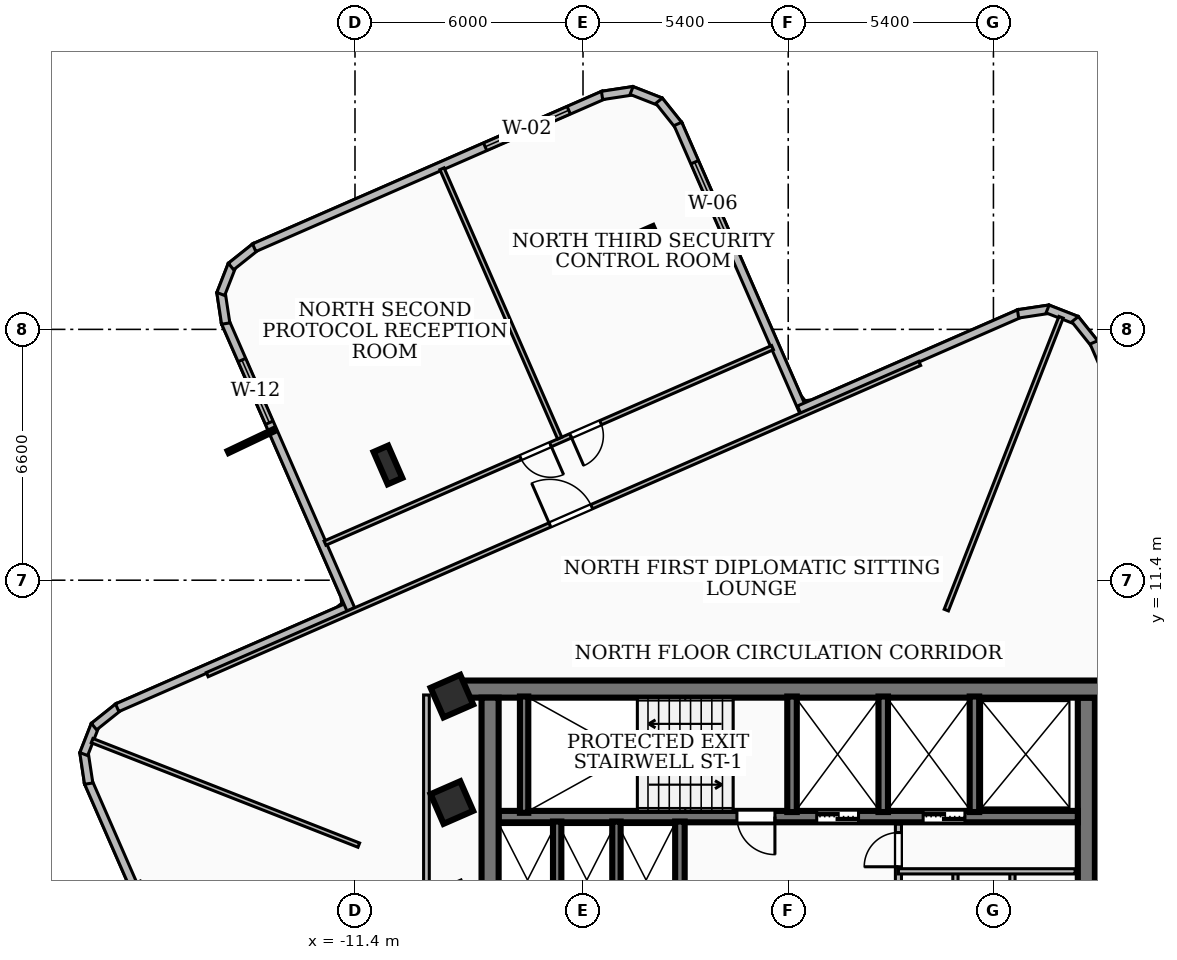
"""IFC4 building model, lengths in metres.
Left out: names, types, materials, properties, quantities, classifications, styles, units other than length and angle.
Written with IfcOpenShell. Run it as: python <this file> out.ifc"""

import sys

from ifc_helpers import new_model, si_unit, direction, frame, frame_2d, origin, origin_2d, place, context, subcontext, project, spatial, rectangle, i_section, extrude, element, fill, save


model = new_model("IFC4")
c1 = context("Model", 3, precision=1e-05, world=origin(), true_north=direction((0.0, 1.0)))
c2 = subcontext(c1, "Body", "Model", "MODEL_VIEW")
j1 = project(units=[si_unit("LENGTHUNIT", "METRE"), si_unit("PLANEANGLEUNIT", "RADIAN")], contexts=[c1])
p1 = place(None, origin())
s1 = spatial("IfcSite", under=j1, at=p1, CompositionType="ELEMENT")
p2 = place(p1, origin())
s2 = spatial("IfcBuilding", under=s1, at=p2, CompositionType="ELEMENT")
p3 = place(p2, frame((0.0, 0.0, 181.08)))
s3 = spatial("IfcBuildingStorey", under=s2, at=p3, CompositionType="ELEMENT", Elevation=181.08)
p4 = place(p3, frame((-8.78, 8.535, 0.0), z_axis=(0.0, 0.0, 1.0), x_axis=(1.0, 0.0, 0.0)))
e1 = element("IfcWall", 1, at=p4, inside=s3, PredefinedType="SHEAR", context=c2, shape_type="SweptSolid", body=[
    extrude(rectangle(XDim=17.56, YDim=0.45, at=frame_2d((8.78, 0.0))), origin(), (0.0, 0.0, 1.0), 3.34),
])
for number, where, z_axis, x_axis in (
    (2, (-7.845, 1.975, 0.0), (0.0, 0.0, 1.0), (0.0, 1.0, 0.0)),
    (3, (7.845, 8.31, 0.0), (0.0, 0.0, 1.0), (0.0, -1.0, 0.0)),
):
    element("IfcWall", number, at=place(p3, frame(where, z_axis=z_axis, x_axis=x_axis)), inside=s3, PredefinedType="SHEAR", context=c2, shape_type="SweptSolid", body=[
        extrude(rectangle(XDim=6.335, YDim=0.45, at=frame_2d((3.167, 0.0))), origin(), (0.0, 0.0, 1.0), 3.34),
    ])
p5 = place(p3, frame((7.62, 5.18, 0.0), z_axis=(0.0, 0.0, 1.0), x_axis=(-1.0, 0.0, 0.0)))
e4 = element("IfcWall", 4, at=p5, inside=s3, PredefinedType="SOLIDWALL", context=c2, shape_type="SweptSolid", body=[
    extrude(rectangle(XDim=15.24, YDim=0.3, at=frame_2d((7.62, 0.0))), origin(), (0.0, 0.0, 1.0), 3.34),
])
p6 = place(p5, frame((5.77, 0.0, 0.0)))
e5 = element("IfcOpeningElement", 5, at=p6, cuts=e4, PredefinedType="OPENING", context=c2, shape_type="SweptSolid", body=[
    extrude(rectangle(XDim=1.1, YDim=2.15, at=frame_2d((0.55, 1.075))), frame((0.0, 0.16, 0.0), z_axis=(0.0, -1.0, 0.0), x_axis=(1.0, 0.0, 0.0)), (0.0, 0.0, 1.0), 0.32),
])
p7 = place(p5, frame((2.97, 0.0, 0.0)))
e6 = element("IfcOpeningElement", 6, at=p7, cuts=e4, PredefinedType="OPENING", context=c2, shape_type="SweptSolid", body=[
    extrude(rectangle(XDim=1.1, YDim=2.15, at=frame_2d((0.55, 1.075))), frame((0.0, 0.16, 0.0), z_axis=(0.0, -1.0, 0.0), x_axis=(1.0, 0.0, 0.0)), (0.0, 0.0, 1.0), 0.32),
])
p8 = place(p5, frame((7.97, 0.0, 0.0)))
e7 = element("IfcOpeningElement", 7, at=p8, cuts=e4, PredefinedType="OPENING", context=c2, shape_type="SweptSolid", body=[
    extrude(rectangle(XDim=1.0, YDim=2.1, at=frame_2d((0.5, 1.05))), frame((0.0, 0.16, 0.0), z_axis=(0.0, -1.0, 0.0), x_axis=(1.0, 0.0, 0.0)), (0.0, 0.0, 1.0), 0.32),
])
p9 = place(p3, frame((-6.95, 5.28, 0.0), z_axis=(0.0, 0.0, 1.0), x_axis=(0.0, 1.0, 0.0)))
e8 = element("IfcWall", 8, at=p9, inside=s3, PredefinedType="SOLIDWALL", context=c2, shape_type="SweptSolid", body=[
    extrude(rectangle(XDim=3.06, YDim=0.22, at=frame_2d((1.53, 0.0))), origin(), (0.0, 0.0, 1.0), 3.34),
])
for number, where, z_axis, x_axis in (
    (9, (0.1, 5.3, 0.0), (0.0, 0.0, 1.0), (0.0, 1.0, 0.0)),
    (10, (2.5, 5.3, 0.0), (0.0, 0.0, 1.0), (0.0, 1.0, 0.0)),
    (11, (4.9, 5.3, 0.0), (0.0, 0.0, 1.0), (0.0, 1.0, 0.0)),
):
    element("IfcWall", number, at=place(p3, frame(where, z_axis=z_axis, x_axis=x_axis)), inside=s3, PredefinedType="SOLIDWALL", context=c2, shape_type="SweptSolid", body=[
        extrude(rectangle(XDim=3.04, YDim=0.25, at=frame_2d((1.52, 0.0))), origin(), (0.0, 0.0, 1.0), 3.34),
    ])
p10 = place(p3, frame((-2.85, 1.98, 0.0), z_axis=(0.0, 0.0, 1.0), x_axis=(0.0, 1.0, 0.0)))
e12 = element("IfcWall", 12, at=p10, inside=s3, PredefinedType="SOLIDWALL", context=c2, shape_type="SweptSolid", body=[
    extrude(rectangle(XDim=3.07, YDim=0.25, at=frame_2d((1.535, 0.0))), origin(), (0.0, 0.0, 1.0), 3.34),
])
for number, where, z_axis, x_axis in (
    (13, (-6.08, 1.98, 0.0), (0.0, 0.0, 1.0), (0.0, 1.0, 0.0)),
    (14, (-4.52, 1.98, 0.0), (0.0, 0.0, 1.0), (0.0, 1.0, 0.0)),
):
    element("IfcWall", number, at=place(p3, frame(where, z_axis=z_axis, x_axis=x_axis)), inside=s3, PredefinedType="SOLIDWALL", context=c2, shape_type="SweptSolid", body=[
        extrude(rectangle(XDim=3.07, YDim=0.22, at=frame_2d((1.535, 0.0))), origin(), (0.0, 0.0, 1.0), 3.34),
    ])
for number, where, z_axis, x_axis in (
    (15, (-8.85, 5.55, 0.0), (0.0, 0.0, 1.0), (0.916, 0.4, 0.0)),
    (16, (-8.85, 8.35, 0.0), (0.0, 0.0, 1.0), (0.916, 0.4, 0.0)),
):
    element("IfcColumn", number, at=place(p3, frame(where, z_axis=z_axis, x_axis=x_axis)), inside=s3, PredefinedType="COLUMN", context=c2, shape_type="SweptSolid", body=[
        extrude(rectangle(XDim=0.85, YDim=0.85, at=origin_2d()), origin(), (0.0, 0.0, 1.0), 3.6),
    ])
for number, where, z_axis, x_axis in (
    (17, (-3.57, 20.207, 0.0), (0.0, 0.0, 1.0), (0.916, 0.4, 0.0)),
    (18, (-10.533, 14.433, 0.0), (0.0, 0.0, 1.0), (0.916, 0.4, 0.0)),
):
    element("IfcColumn", number, at=place(p3, frame(where, z_axis=z_axis, x_axis=x_axis)), inside=s3, PredefinedType="COLUMN", context=c2, shape_type="SweptSolid", body=[
        extrude(i_section(OverallWidth=0.418, OverallDepth=0.927, WebThickness=0.019, FlangeThickness=0.032, at=origin_2d()), origin(), (0.0, 0.0, 1.0), 3.6),
    ])
p11 = place(p3, frame((-15.883, 0.287, 0.0), z_axis=(0.0, 0.0, 1.0), x_axis=(-0.400352069216, 0.916361402872, 0.0)))
e19 = element("IfcWall", 19, at=p11, inside=s3, PredefinedType="SOLIDWALL", context=c2, shape_type="SweptSolid", body=[
    extrude(rectangle(XDim=6.339, YDim=0.22, at=frame_2d((3.169, 0.0))), origin(), (0.0, 0.0, 1.0), 3.34),
])
p12 = place(p3, frame((-18.407, 6.048, 0.0), z_axis=(0.0, 0.0, 1.0), x_axis=(-0.149814047271, 0.988714190876, 0.0)))
e20 = element("IfcWall", 20, at=p12, inside=s3, PredefinedType="SOLIDWALL", context=c2, shape_type="SweptSolid", body=[
    extrude(rectangle(XDim=0.834, YDim=0.22, at=frame_2d((0.417, 0.0))), origin(), (0.0, 0.0, 1.0), 3.34),
])
p13 = place(p3, frame((-18.537, 6.825, 0.0), z_axis=(0.0, 0.0, 1.0), x_axis=(0.364331843435, 0.931269191941, 0.0)))
e21 = element("IfcWall", 21, at=p13, inside=s3, PredefinedType="SOLIDWALL", context=c2, shape_type="SweptSolid", body=[
    extrude(rectangle(XDim=0.818, YDim=0.22, at=frame_2d((0.409, 0.0))), origin(), (0.0, 0.0, 1.0), 3.34),
])
p14 = place(p3, frame((-18.268, 7.548, 0.0), z_axis=(0.0, 0.0, 1.0), x_axis=(0.781153625844, 0.624338860581, 0.0)))
e22 = element("IfcWall", 22, at=p14, inside=s3, PredefinedType="SOLIDWALL", context=c2, shape_type="SweptSolid", body=[
    extrude(rectangle(XDim=0.836, YDim=0.22, at=frame_2d((0.418, 0.0))), origin(), (0.0, 0.0, 1.0), 3.34),
])
p15 = place(p3, frame((-17.658, 8.044, 0.0), z_axis=(0.0, 0.0, 1.0), x_axis=(0.916361145567, 0.400352658158, 0.0)))
e23 = element("IfcWall", 23, at=p15, inside=s3, PredefinedType="SOLIDWALL", context=c2, shape_type="SweptSolid", body=[
    extrude(rectangle(XDim=6.759, YDim=0.22, at=frame_2d((3.38, 0.0))), origin(), (0.0, 0.0, 1.0), 3.34),
])
p16 = place(p3, frame((-11.51, 10.634, 0.0), z_axis=(0.0, 0.0, 1.0), x_axis=(-0.400350381948, 0.916362140027, 0.0)))
e24 = element("IfcWall", 24, at=p16, inside=s3, PredefinedType="SOLIDWALL", context=c2, shape_type="SweptSolid", body=[
    extrude(rectangle(XDim=8.258, YDim=0.22, at=frame_2d((4.129, 0.0))), origin(), (0.0, 0.0, 1.0), 3.34),
])
p17 = place(p16, frame((5.358, 0.0, 0.85)))
e25 = element("IfcOpeningElement", 25, at=p17, cuts=e24, PredefinedType="OPENING", context=c2, shape_type="SweptSolid", body=[
    extrude(rectangle(XDim=1.8, YDim=1.6, at=frame_2d((0.9, 0.8))), frame((0.0, 0.12, 0.0), z_axis=(0.0, -1.0, 0.0), x_axis=(1.0, 0.0, 0.0)), (0.0, 0.0, 1.0), 0.24),
])
p18 = place(p3, frame((-14.802, 18.153, 0.0), z_axis=(0.0, 0.0, 1.0), x_axis=(-0.149640878591, 0.988740414596, 0.0)))
e26 = element("IfcWall", 26, at=p18, inside=s3, PredefinedType="SOLIDWALL", context=c2, shape_type="SweptSolid", body=[
    extrude(rectangle(XDim=0.835, YDim=0.22, at=frame_2d((0.418, 0.0))), origin(), (0.0, 0.0, 1.0), 3.34),
])
p19 = place(p3, frame((-14.932, 18.931, 0.0), z_axis=(0.0, 0.0, 1.0), x_axis=(0.36397185601, 0.931409946282, 0.0)))
e27 = element("IfcWall", 27, at=p19, inside=s3, PredefinedType="SOLIDWALL", context=c2, shape_type="SweptSolid", body=[
    extrude(rectangle(XDim=0.818, YDim=0.22, at=frame_2d((0.409, 0.0))), origin(), (0.0, 0.0, 1.0), 3.34),
])
p20 = place(p3, frame((-14.663, 19.654, 0.0), z_axis=(0.0, 0.0, 1.0), x_axis=(0.781723393747, 0.623625316731, 0.0)))
e28 = element("IfcWall", 28, at=p20, inside=s3, PredefinedType="SOLIDWALL", context=c2, shape_type="SweptSolid", body=[
    extrude(rectangle(XDim=0.835, YDim=0.22, at=frame_2d((0.418, 0.0))), origin(), (0.0, 0.0, 1.0), 3.34),
])
p21 = place(p3, frame((-14.053, 20.149, 0.0), z_axis=(0.0, 0.0, 1.0), x_axis=(0.916369802617, 0.400332842585, 0.0)))
e29 = element("IfcWall", 29, at=p21, inside=s3, PredefinedType="SOLIDWALL", context=c2, shape_type="SweptSolid", body=[
    extrude(rectangle(XDim=10.042, YDim=0.22, at=frame_2d((5.021, 0.0))), origin(), (0.0, 0.0, 1.0), 3.34),
])
p22 = place(p21, frame((6.633, 0.0, 0.85)))
e30 = element("IfcOpeningElement", 30, at=p22, cuts=e29, PredefinedType="OPENING", context=c2, shape_type="SweptSolid", body=[
    extrude(rectangle(XDim=2.4, YDim=2.1, at=frame_2d((1.2, 1.05))), frame((0.0, 0.12, 0.0), z_axis=(0.0, -1.0, 0.0), x_axis=(1.0, 0.0, 0.0)), (0.0, 0.0, 1.0), 0.24),
])
p23 = place(p3, frame((-4.899, 24.155, 0.0), z_axis=(0.0, 0.0, 1.0), x_axis=(0.988714190876, 0.149814047271, 0.0)))
e31 = element("IfcWall", 31, at=p23, inside=s3, PredefinedType="SOLIDWALL", context=c2, shape_type="SweptSolid", body=[
    extrude(rectangle(XDim=0.834, YDim=0.22, at=frame_2d((0.417, 0.0))), origin(), (0.0, 0.0, 1.0), 3.34),
])
p24 = place(p3, frame((-4.122, 24.285, 0.0), z_axis=(0.0, 0.0, 1.0), x_axis=(0.931370407378, -0.364073020507, 0.0)))
e32 = element("IfcWall", 32, at=p24, inside=s3, PredefinedType="SOLIDWALL", context=c2, shape_type="SweptSolid", body=[
    extrude(rectangle(XDim=0.818, YDim=0.22, at=frame_2d((0.409, 0.0))), origin(), (0.0, 0.0, 1.0), 3.34),
])
p25 = place(p3, frame((-3.399, 24.016, 0.0), z_axis=(0.0, 0.0, 1.0), x_axis=(0.624338860581, -0.781153625844, 0.0)))
e33 = element("IfcWall", 33, at=p25, inside=s3, PredefinedType="SOLIDWALL", context=c2, shape_type="SweptSolid", body=[
    extrude(rectangle(XDim=0.836, YDim=0.22, at=frame_2d((0.418, 0.0))), origin(), (0.0, 0.0, 1.0), 3.34),
])
p26 = place(p3, frame((-2.903, 23.406, 0.0), z_axis=(0.0, 0.0, 1.0), x_axis=(0.400277606131, -0.916393931685, 0.0)))
e34 = element("IfcWall", 34, at=p26, inside=s3, PredefinedType="SOLIDWALL", context=c2, shape_type="SweptSolid", body=[
    extrude(rectangle(XDim=8.26, YDim=0.22, at=frame_2d((4.13, 0.0))), origin(), (0.0, 0.0, 1.0), 3.34),
])
p27 = place(p26, frame((1.1, 0.0, 0.85)))
e35 = element("IfcOpeningElement", 35, at=p27, cuts=e34, PredefinedType="OPENING", context=c2, shape_type="SweptSolid", body=[
    extrude(rectangle(XDim=2.4, YDim=1.85, at=frame_2d((1.2, 0.925))), frame((0.0, 0.12, 0.0), z_axis=(0.0, -1.0, 0.0), x_axis=(1.0, 0.0, 0.0)), (0.0, 0.0, 1.0), 0.24),
])
p28 = place(p3, frame((0.287, 15.883, 0.0), z_axis=(0.0, 0.0, 1.0), x_axis=(0.916361402872, 0.400352069216, 0.0)))
e36 = element("IfcWall", 36, at=p28, inside=s3, PredefinedType="SOLIDWALL", context=c2, shape_type="SweptSolid", body=[
    extrude(rectangle(XDim=6.339, YDim=0.22, at=frame_2d((3.169, 0.0))), origin(), (0.0, 0.0, 1.0), 3.34),
])
p29 = place(p3, frame((6.048, 18.407, 0.0), z_axis=(0.0, 0.0, 1.0), x_axis=(0.988714190876, 0.149814047271, 0.0)))
e37 = element("IfcWall", 37, at=p29, inside=s3, PredefinedType="SOLIDWALL", context=c2, shape_type="SweptSolid", body=[
    extrude(rectangle(XDim=0.834, YDim=0.22, at=frame_2d((0.417, 0.0))), origin(), (0.0, 0.0, 1.0), 3.34),
])
p30 = place(p3, frame((6.825, 18.537, 0.0), z_axis=(0.0, 0.0, 1.0), x_axis=(0.931269191941, -0.364331843435, 0.0)))
e38 = element("IfcWall", 38, at=p30, inside=s3, PredefinedType="SOLIDWALL", context=c2, shape_type="SweptSolid", body=[
    extrude(rectangle(XDim=0.818, YDim=0.22, at=frame_2d((0.409, 0.0))), origin(), (0.0, 0.0, 1.0), 3.34),
])
p31 = place(p3, frame((7.548, 18.268, 0.0), z_axis=(0.0, 0.0, 1.0), x_axis=(0.624338860581, -0.781153625844, 0.0)))
e39 = element("IfcWall", 39, at=p31, inside=s3, PredefinedType="SOLIDWALL", context=c2, shape_type="SweptSolid", body=[
    extrude(rectangle(XDim=0.836, YDim=0.22, at=frame_2d((0.418, 0.0))), origin(), (0.0, 0.0, 1.0), 3.34),
])
p32 = place(p3, frame((8.044, 17.658, 0.0), z_axis=(0.0, 0.0, 1.0), x_axis=(0.400352658158, -0.916361145567, 0.0)))
e40 = element("IfcWall", 40, at=p32, inside=s3, PredefinedType="SOLIDWALL", context=c2, shape_type="SweptSolid", body=[
    extrude(rectangle(XDim=6.759, YDim=0.22, at=frame_2d((3.38, 0.0))), origin(), (0.0, 0.0, 1.0), 3.34),
])
p33 = place(p3, frame((2.9, 2.04, 0.0), z_axis=(0.0, 0.0, 1.0), x_axis=(0.0, 1.0, 0.0)))
e41 = element("IfcWall", 41, at=p33, inside=s3, PredefinedType="PARTITIONING", context=c2, shape_type="SweptSolid", body=[
    extrude(rectangle(XDim=2.94, YDim=0.16, at=frame_2d((1.47, 0.0))), origin(), (0.0, 0.0, 1.0), 2.57),
])
p34 = place(p33, frame((1.82, 0.0, 0.0)))
e42 = element("IfcOpeningElement", 42, at=p34, cuts=e41, PredefinedType="OPENING", context=c2, shape_type="SweptSolid", body=[
    extrude(rectangle(XDim=0.9, YDim=2.06, at=frame_2d((0.45, 1.03))), frame((0.0, 0.09, 0.0), z_axis=(0.0, -1.0, 0.0), x_axis=(1.0, 0.0, 0.0)), (0.0, 0.0, 1.0), 0.18),
])
p35 = place(p3, frame((2.9, 3.74, 0.0), z_axis=(0.0, 0.0, 1.0), x_axis=(1.0, 0.0, 0.0)))
e43 = element("IfcWall", 43, at=p35, inside=s3, PredefinedType="PARTITIONING", context=c2, shape_type="SweptSolid", body=[
    extrude(rectangle(XDim=4.65, YDim=0.138, at=frame_2d((2.325, 0.0))), origin(), (0.0, 0.0, 1.0), 3.34),
])
for number, where, z_axis, x_axis in (
    (44, (4.4, 1.85, 0.0), (0.0, 0.0, 1.0), (0.0, 1.0, 0.0)),
    (45, (5.9, 1.85, 0.0), (0.0, 0.0, 1.0), (0.0, 1.0, 0.0)),
):
    element("IfcWall", number, at=place(p3, frame(where, z_axis=z_axis, x_axis=x_axis)), inside=s3, PredefinedType="PARTITIONING", context=c2, shape_type="SweptSolid", body=[
        extrude(rectangle(XDim=1.89, YDim=0.138, at=frame_2d((0.945, 0.0))), origin(), (0.0, 0.0, 1.0), 2.57),
    ])
p36 = place(p3, frame((-9.52, 1.75, 0.0), z_axis=(0.0, 0.0, 1.0), x_axis=(0.0, 1.0, 0.0)))
e46 = element("IfcWall", 46, at=p36, inside=s3, PredefinedType="PARTITIONING", context=c2, shape_type="SweptSolid", body=[
    extrude(rectangle(XDim=6.63, YDim=0.15, at=frame_2d((3.315, 0.0))), origin(), (0.0, 0.0, 1.0), 3.34),
])
p37 = place(p3, frame((4.16, 10.614, 0.0), z_axis=(0.0, 0.0, 1.0), x_axis=(0.364859873544, 0.931062442953, 0.0)))
e47 = element("IfcWall", 47, at=p37, inside=s3, PredefinedType="PARTITIONING", context=c2, shape_type="SweptSolid", body=[
    extrude(rectangle(XDim=8.274, YDim=0.12, at=frame_2d((4.137, 0.0))), origin(), (0.0, 0.0, 1.0), 3.34),
])
p38 = place(p3, frame((-11.3, 4.429, 0.0), z_axis=(0.0, 0.0, 1.0), x_axis=(-0.931071596241, 0.364836514995, 0.0)))
e48 = element("IfcWall", 48, at=p38, inside=s3, PredefinedType="PARTITIONING", context=c2, shape_type="SweptSolid", body=[
    extrude(rectangle(XDim=7.538, YDim=0.12, at=frame_2d((3.769, 0.0))), origin(), (0.0, 0.0, 1.0), 3.34),
])
p39 = place(p3, frame((-15.288, 8.915, 0.0), z_axis=(0.0, 0.0, 1.0), x_axis=(0.916368627962, 0.400335531383, 0.0)))
e49 = element("IfcWall", 49, at=p39, inside=s3, PredefinedType="PARTITIONING", context=c2, shape_type="SweptSolid", body=[
    extrude(rectangle(XDim=20.46, YDim=0.12, at=frame_2d((10.23, 0.0))), origin(), (0.0, 0.0, 1.0), 2.644),
])
p40 = place(p39, frame((9.84, 0.0, 0.0)))
e50 = element("IfcOpeningElement", 50, at=p40, cuts=e49, PredefinedType="OPENING", context=c2, shape_type="SweptSolid", body=[
    extrude(rectangle(XDim=1.2, YDim=2.1, at=frame_2d((0.6, 1.05))), frame((0.0, 0.07, 0.0), z_axis=(0.0, -1.0, 0.0), x_axis=(1.0, 0.0, 0.0)), (0.0, 0.0, 1.0), 0.14),
])
p41 = place(p3, frame((-6.014, 15.139, 0.0), z_axis=(0.0, 0.0, 1.0), x_axis=(-0.400442909306, 0.916321710092, 0.0)))
e51 = element("IfcWall", 51, at=p41, inside=s3, PredefinedType="PARTITIONING", context=c2, shape_type="SweptSolid", body=[
    extrude(rectangle(XDim=7.734, YDim=0.12, at=frame_2d((3.867, 0.0))), origin(), (0.0, 0.0, 1.0), 3.34),
])
p42 = place(p3, frame((-0.414, 17.52, 0.0), z_axis=(0.0, 0.0, 1.0), x_axis=(-0.916370877059, -0.400330383156, 0.0)))
e52 = element("IfcWall", 52, at=p42, inside=s3, PredefinedType="PARTITIONING", context=c2, shape_type="SweptSolid", body=[
    extrude(rectangle(XDim=12.85, YDim=0.12, at=frame_2d((6.425, 0.0))), origin(), (0.0, 0.0, 1.0), 2.644),
])
p43 = place(p42, frame((4.935, 0.0, 0.0)))
e53 = element("IfcOpeningElement", 53, at=p43, cuts=e52, PredefinedType="OPENING", context=c2, shape_type="SweptSolid", body=[
    extrude(rectangle(XDim=0.86, YDim=2.04, at=frame_2d((0.43, 1.02))), frame((0.0, 0.07, 0.0), z_axis=(0.0, -1.0, 0.0), x_axis=(1.0, 0.0, 0.0)), (0.0, 0.0, 1.0), 0.14),
])
p44 = place(p42, frame((6.375, 0.0, 0.0)))
e54 = element("IfcOpeningElement", 54, at=p44, cuts=e52, PredefinedType="OPENING", context=c2, shape_type="SweptSolid", body=[
    extrude(rectangle(XDim=0.86, YDim=2.04, at=frame_2d((0.43, 1.02))), frame((0.0, 0.07, 0.0), z_axis=(0.0, -1.0, 0.0), x_axis=(1.0, 0.0, 0.0)), (0.0, 0.0, 1.0), 0.14),
])
p45 = place(p17, origin())
e55 = element("IfcWindow", 55, at=p45, inside=s3, PartitioningType="SINGLE_PANEL", PredefinedType="WINDOW", context=c2, shape_type="SweptSolid", body=[
    extrude(rectangle(XDim=1.8, YDim=1.6, at=frame_2d((0.9, 0.8))), frame((0.0, 0.03, 0.0), z_axis=(0.0, -1.0, 0.0), x_axis=(1.0, 0.0, 0.0)), (0.0, 0.0, 1.0), 0.06),
])
fill(e25, e55)
p46 = place(p22, origin())
e56 = element("IfcWindow", 56, at=p46, inside=s3, PartitioningType="SINGLE_PANEL", PredefinedType="WINDOW", context=c2, shape_type="SweptSolid", body=[
    extrude(rectangle(XDim=2.4, YDim=2.1, at=frame_2d((1.2, 1.05))), frame((0.0, 0.03, 0.0), z_axis=(0.0, -1.0, 0.0), x_axis=(1.0, 0.0, 0.0)), (0.0, 0.0, 1.0), 0.06),
])
fill(e30, e56)
p47 = place(p27, origin())
e57 = element("IfcWindow", 57, at=p47, inside=s3, PartitioningType="SINGLE_PANEL", PredefinedType="WINDOW", context=c2, shape_type="SweptSolid", body=[
    extrude(rectangle(XDim=2.4, YDim=1.85, at=frame_2d((1.2, 0.925))), frame((0.0, 0.03, 0.0), z_axis=(0.0, -1.0, 0.0), x_axis=(1.0, 0.0, 0.0)), (0.0, 0.0, 1.0), 0.06),
])
fill(e35, e57)
p48 = place(p6, origin())
e58 = element("IfcDoor", 58, at=p48, inside=s3, OperationType="DOUBLE_DOOR_SLIDING", PredefinedType="DOOR", context=c2, shape_type="SweptSolid", body=[
    extrude(rectangle(XDim=1.1, YDim=2.15, at=frame_2d((0.55, 1.075))), frame((0.0, 0.025, 0.0), z_axis=(0.0, -1.0, 0.0), x_axis=(1.0, 0.0, 0.0)), (0.0, 0.0, 1.0), 0.05),
])
fill(e5, e58)
p49 = place(p7, origin())
e59 = element("IfcDoor", 59, at=p49, inside=s3, OperationType="DOUBLE_DOOR_SLIDING", PredefinedType="DOOR", context=c2, shape_type="SweptSolid", body=[
    extrude(rectangle(XDim=1.1, YDim=2.15, at=frame_2d((0.55, 1.075))), frame((0.0, 0.025, 0.0), z_axis=(0.0, -1.0, 0.0), x_axis=(1.0, 0.0, 0.0)), (0.0, 0.0, 1.0), 0.05),
])
fill(e6, e59)
p50 = place(p8, origin())
e60 = element("IfcDoor", 60, at=p50, inside=s3, OperationType="SINGLE_SWING_LEFT", PredefinedType="DOOR", context=c2, shape_type="SweptSolid", body=[
    extrude(rectangle(XDim=1.0, YDim=2.1, at=frame_2d((0.5, 1.05))), frame((0.0, 0.025, 0.0), z_axis=(0.0, -1.0, 0.0), x_axis=(1.0, 0.0, 0.0)), (0.0, 0.0, 1.0), 0.05),
])
fill(e7, e60)
p51 = place(p34, origin())
e61 = element("IfcDoor", 61, at=p51, inside=s3, OperationType="SINGLE_SWING_LEFT", PredefinedType="DOOR", context=c2, shape_type="SweptSolid", body=[
    extrude(rectangle(XDim=0.9, YDim=2.06, at=frame_2d((0.45, 1.03))), frame((0.0, 0.025, 0.0), z_axis=(0.0, -1.0, 0.0), x_axis=(1.0, 0.0, 0.0)), (0.0, 0.0, 1.0), 0.05),
])
fill(e42, e61)
p52 = place(p40, origin())
e62 = element("IfcDoor", 62, at=p52, inside=s3, OperationType="SINGLE_SWING_LEFT", PredefinedType="DOOR", context=c2, shape_type="SweptSolid", body=[
    extrude(rectangle(XDim=1.2, YDim=2.1, at=frame_2d((0.6, 1.05))), frame((0.0, 0.025, 0.0), z_axis=(0.0, -1.0, 0.0), x_axis=(1.0, 0.0, 0.0)), (0.0, 0.0, 1.0), 0.05),
])
fill(e50, e62)
p53 = place(p43, origin())
e63 = element("IfcDoor", 63, at=p53, inside=s3, OperationType="SINGLE_SWING_RIGHT", PredefinedType="DOOR", context=c2, shape_type="SweptSolid", body=[
    extrude(rectangle(XDim=0.86, YDim=2.04, at=frame_2d((0.43, 1.02))), frame((0.0, 0.025, 0.0), z_axis=(0.0, -1.0, 0.0), x_axis=(1.0, 0.0, 0.0)), (0.0, 0.0, 1.0), 0.05),
])
fill(e53, e63)
p54 = place(p44, origin())
e64 = element("IfcDoor", 64, at=p54, inside=s3, OperationType="SINGLE_SWING_LEFT", PredefinedType="DOOR", context=c2, shape_type="SweptSolid", body=[
    extrude(rectangle(XDim=0.86, YDim=2.04, at=frame_2d((0.43, 1.02))), frame((0.0, 0.025, 0.0), z_axis=(0.0, -1.0, 0.0), x_axis=(1.0, 0.0, 0.0)), (0.0, 0.0, 1.0), 0.05),
])
fill(e54, e64)
save(model, sys.argv[1])
